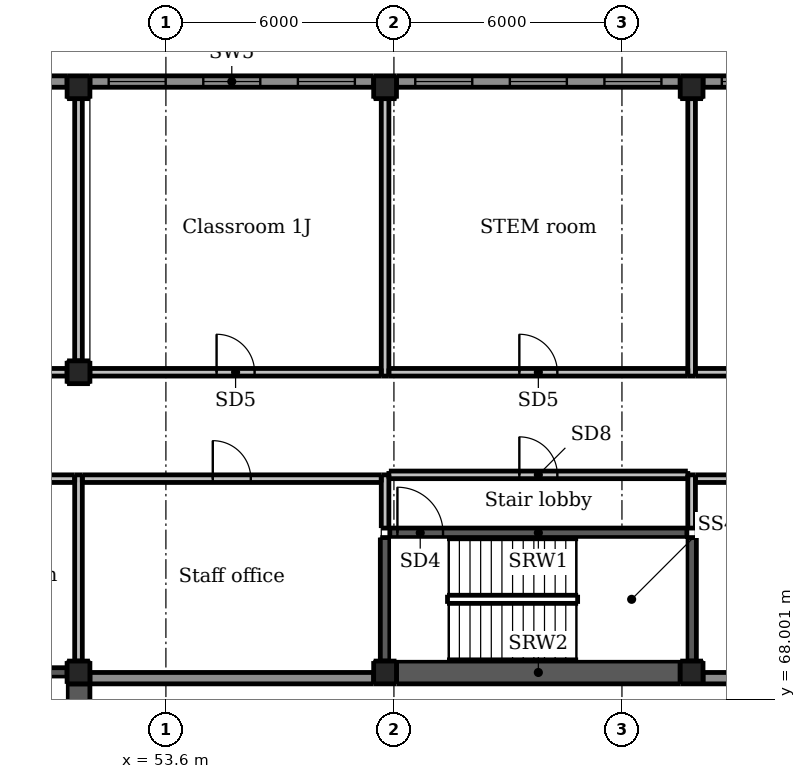
"""IFC4 building model, lengths in metres.
Left out: names, types, materials, properties, quantities, classifications, styles, units other than length and angle.
Written with IfcOpenShell. Run it as: python <this file> out.ifc"""

import sys

from ifc_helpers import new_model, si_unit, direction, frame, frame_2d, origin, origin_2d, place, context, subcontext, project, spatial, rectangle, extrude, element, fill, save


model = new_model("IFC4")
c1 = context("Model", 3, precision=1e-05, world=origin(), true_north=direction((0.0, 1.0)))
c2 = subcontext(c1, "Body", "Model", "MODEL_VIEW")
j1 = project(units=[si_unit("LENGTHUNIT", "METRE"), si_unit("PLANEANGLEUNIT", "RADIAN")], contexts=[c1])
p1 = place(None, origin())
s1 = spatial("IfcSite", under=j1, at=p1, CompositionType="ELEMENT")
p2 = place(p1, origin())
s2 = spatial("IfcBuilding", under=s1, at=p2, CompositionType="ELEMENT")
p3 = place(p2, frame((0.0, 0.0, 5.5)))
s3 = spatial("IfcBuildingStorey", under=s2, at=p3, CompositionType="ELEMENT", Elevation=5.5)
for number, where, z_axis, x_axis in (
    (1, (51.3, 68.7, -0.3), (0.0, 0.0, 1.0), (1.0, 0.0, 0.0)),
    (2, (51.3, 76.6, -0.3), (0.0, 0.0, 1.0), (1.0, 0.0, 0.0)),
    (3, (51.3, 84.1, -0.3), (0.0, 0.0, 1.0), (1.0, 0.0, 0.0)),
    (4, (59.367, 84.1, -0.3), (0.0, 0.0, 1.0), (1.0, 0.0, 0.0)),
    (5, (59.367, 68.7, -0.3), (0.0, 0.0, 1.0), (1.0, 0.0, 0.0)),
    (6, (67.433, 84.1, -0.3), (0.0, 0.0, 1.0), (1.0, 0.0, 0.0)),
    (7, (67.433, 68.7, -0.3), (0.0, 0.0, 1.0), (1.0, 0.0, 0.0)),
):
    element("IfcColumn", number, at=place(p3, frame(where, z_axis=z_axis, x_axis=x_axis)), inside=s3, PredefinedType="COLUMN", context=c2, shape_type="SweptSolid", body=[
        extrude(rectangle(XDim=0.6, YDim=0.6, at=origin_2d()), origin(), (0.0, 0.0, 1.0), 4.5),
    ])
p4 = place(p3, frame((47.5, 68.7, -0.3), z_axis=(0.0, 0.0, 1.0), x_axis=(1.0, 0.0, 0.0)))
e8 = element("IfcWall", 8, at=p4, inside=s3, PredefinedType="SHEAR", context=c2, shape_type="SweptSolid", body=[
    extrude(rectangle(XDim=3.5, YDim=0.25, at=frame_2d((1.75, 0.0))), origin(), (0.0, 0.0, 1.0), 4.5),
])
p5 = place(p3, frame((51.3, 61.45, -0.3), z_axis=(0.0, 0.0, 1.0), x_axis=(0.0, 1.0, 0.0)))
e9 = element("IfcWall", 9, at=p5, inside=s3, PredefinedType="SHEAR", context=c2, shape_type="SweptSolid", body=[
    extrude(rectangle(XDim=6.95, YDim=0.6, at=frame_2d((3.475, 0.0))), origin(), (0.0, 0.0, 1.0), 4.5),
])
p6 = place(p3, frame((59.492, 72.375, -0.3), z_axis=(0.0, 0.0, 1.0), x_axis=(1.0, 0.0, 0.0)))
e10 = element("IfcWall", 10, at=p6, inside=s3, PredefinedType="SHEAR", context=c2, shape_type="SweptSolid", body=[
    extrude(rectangle(XDim=7.816, YDim=0.25, at=frame_2d((3.908, 0.0))), origin(), (0.0, 0.0, 1.0), 4.5),
])
p7 = place(p6, frame((0.2, 0.0, 0.3)))
e11 = element("IfcOpeningElement", 11, at=p7, cuts=e10, PredefinedType="OPENING", context=c2, shape_type="SweptSolid", body=[
    extrude(rectangle(XDim=1.2, YDim=2.1, at=frame_2d((0.6, 1.05))), frame((0.0, 0.135, 0.0), z_axis=(0.0, -1.0, 0.0), x_axis=(1.0, 0.0, 0.0)), (0.0, 0.0, 1.0), 0.27),
])
for number, where, z_axis, x_axis in (
    (12, (59.367, 69.0, -0.3), (0.0, 0.0, 1.0), (0.0, 1.0, 0.0)),
    (13, (67.433, 69.0, -0.3), (0.0, 0.0, 1.0), (0.0, 1.0, 0.0)),
):
    element("IfcWall", number, at=place(p3, frame(where, z_axis=z_axis, x_axis=x_axis)), inside=s3, PredefinedType="SHEAR", context=c2, shape_type="SweptSolid", body=[
        extrude(rectangle(XDim=3.25, YDim=0.25, at=frame_2d((1.625, 0.0))), origin(), (0.0, 0.0, 1.0), 4.5),
    ])
p8 = place(p3, frame((59.667, 68.7, -0.3), z_axis=(0.0, 0.0, 1.0), x_axis=(1.0, 0.0, 0.0)))
e14 = element("IfcWall", 14, at=p8, inside=s3, PredefinedType="SHEAR", context=c2, shape_type="SweptSolid", body=[
    extrude(rectangle(XDim=7.466, YDim=0.6, at=frame_2d((3.733, 0.0))), origin(), (0.0, 0.0, 1.0), 4.5),
])
p9 = place(p3, frame((43.9, 84.25, 0.0), z_axis=(0.0, 0.0, 1.0), x_axis=(1.0, 0.0, 0.0)))
e15 = element("IfcWall", 15, at=p9, inside=s3, PredefinedType="SOLIDWALL", context=c2, shape_type="SweptSolid", body=[
    extrude(rectangle(XDim=7.1, YDim=0.3, at=frame_2d((3.55, 0.0))), origin(), (0.0, 0.0, 1.0), 3.3),
])
p10 = place(p9, frame((0.433, 0.0, 0.9)))
e16 = element("IfcOpeningElement", 16, at=p10, cuts=e15, PredefinedType="OPENING", context=c2, shape_type="SweptSolid", body=[
    extrude(rectangle(XDim=1.5, YDim=1.5, at=frame_2d((0.75, 0.75))), frame((0.0, 0.16, 0.0), z_axis=(0.0, -1.0, 0.0), x_axis=(1.0, 0.0, 0.0)), (0.0, 0.0, 1.0), 0.32),
])
p11 = place(p9, frame((2.8, 0.0, 0.9)))
e17 = element("IfcOpeningElement", 17, at=p11, cuts=e15, PredefinedType="OPENING", context=c2, shape_type="SweptSolid", body=[
    extrude(rectangle(XDim=1.5, YDim=1.5, at=frame_2d((0.75, 0.75))), frame((0.0, 0.16, 0.0), z_axis=(0.0, -1.0, 0.0), x_axis=(1.0, 0.0, 0.0)), (0.0, 0.0, 1.0), 0.32),
])
p12 = place(p9, frame((5.167, 0.0, 0.9)))
e18 = element("IfcOpeningElement", 18, at=p12, cuts=e15, PredefinedType="OPENING", context=c2, shape_type="SweptSolid", body=[
    extrude(rectangle(XDim=1.5, YDim=1.5, at=frame_2d((0.75, 0.75))), frame((0.0, 0.16, 0.0), z_axis=(0.0, -1.0, 0.0), x_axis=(1.0, 0.0, 0.0)), (0.0, 0.0, 1.0), 0.32),
])
p13 = place(p3, frame((51.6, 84.25, 0.0), z_axis=(0.0, 0.0, 1.0), x_axis=(1.0, 0.0, 0.0)))
e19 = element("IfcWall", 19, at=p13, inside=s3, PredefinedType="SOLIDWALL", context=c2, shape_type="SweptSolid", body=[
    extrude(rectangle(XDim=7.467, YDim=0.3, at=frame_2d((3.733, 0.0))), origin(), (0.0, 0.0, 1.0), 3.3),
])
p14 = place(p13, frame((0.494, 0.0, 0.9)))
e20 = element("IfcOpeningElement", 20, at=p14, cuts=e19, PredefinedType="OPENING", context=c2, shape_type="SweptSolid", body=[
    extrude(rectangle(XDim=1.5, YDim=1.5, at=frame_2d((0.75, 0.75))), frame((0.0, 0.16, 0.0), z_axis=(0.0, -1.0, 0.0), x_axis=(1.0, 0.0, 0.0)), (0.0, 0.0, 1.0), 0.32),
])
p15 = place(p13, frame((2.983, 0.0, 0.9)))
e21 = element("IfcOpeningElement", 21, at=p15, cuts=e19, PredefinedType="OPENING", context=c2, shape_type="SweptSolid", body=[
    extrude(rectangle(XDim=1.5, YDim=1.5, at=frame_2d((0.75, 0.75))), frame((0.0, 0.16, 0.0), z_axis=(0.0, -1.0, 0.0), x_axis=(1.0, 0.0, 0.0)), (0.0, 0.0, 1.0), 0.32),
])
p16 = place(p13, frame((5.472, 0.0, 0.9)))
e22 = element("IfcOpeningElement", 22, at=p16, cuts=e19, PredefinedType="OPENING", context=c2, shape_type="SweptSolid", body=[
    extrude(rectangle(XDim=1.5, YDim=1.5, at=frame_2d((0.75, 0.75))), frame((0.0, 0.16, 0.0), z_axis=(0.0, -1.0, 0.0), x_axis=(1.0, 0.0, 0.0)), (0.0, 0.0, 1.0), 0.32),
])
p17 = place(p3, frame((59.667, 84.25, 0.0), z_axis=(0.0, 0.0, 1.0), x_axis=(1.0, 0.0, 0.0)))
e23 = element("IfcWall", 23, at=p17, inside=s3, PredefinedType="SOLIDWALL", context=c2, shape_type="SweptSolid", body=[
    extrude(rectangle(XDim=7.466, YDim=0.3, at=frame_2d((3.733, 0.0))), origin(), (0.0, 0.0, 1.0), 3.3),
])
p18 = place(p17, frame((0.494, 0.0, 0.9)))
e24 = element("IfcOpeningElement", 24, at=p18, cuts=e23, PredefinedType="OPENING", context=c2, shape_type="SweptSolid", body=[
    extrude(rectangle(XDim=1.5, YDim=1.5, at=frame_2d((0.75, 0.75))), frame((0.0, 0.16, 0.0), z_axis=(0.0, -1.0, 0.0), x_axis=(1.0, 0.0, 0.0)), (0.0, 0.0, 1.0), 0.32),
])
p19 = place(p17, frame((2.983, 0.0, 0.9)))
e25 = element("IfcOpeningElement", 25, at=p19, cuts=e23, PredefinedType="OPENING", context=c2, shape_type="SweptSolid", body=[
    extrude(rectangle(XDim=1.5, YDim=1.5, at=frame_2d((0.75, 0.75))), frame((0.0, 0.16, 0.0), z_axis=(0.0, -1.0, 0.0), x_axis=(1.0, 0.0, 0.0)), (0.0, 0.0, 1.0), 0.32),
])
p20 = place(p17, frame((5.472, 0.0, 0.9)))
e26 = element("IfcOpeningElement", 26, at=p20, cuts=e23, PredefinedType="OPENING", context=c2, shape_type="SweptSolid", body=[
    extrude(rectangle(XDim=1.5, YDim=1.5, at=frame_2d((0.75, 0.75))), frame((0.0, 0.16, 0.0), z_axis=(0.0, -1.0, 0.0), x_axis=(1.0, 0.0, 0.0)), (0.0, 0.0, 1.0), 0.32),
])
p21 = place(p3, frame((67.733, 84.25, 0.0), z_axis=(0.0, 0.0, 1.0), x_axis=(1.0, 0.0, 0.0)))
e27 = element("IfcWall", 27, at=p21, inside=s3, PredefinedType="SOLIDWALL", context=c2, shape_type="SweptSolid", body=[
    extrude(rectangle(XDim=7.467, YDim=0.3, at=frame_2d((3.733, 0.0))), origin(), (0.0, 0.0, 1.0), 3.3),
])
p22 = place(p21, frame((0.494, 0.0, 0.9)))
e28 = element("IfcOpeningElement", 28, at=p22, cuts=e27, PredefinedType="OPENING", context=c2, shape_type="SweptSolid", body=[
    extrude(rectangle(XDim=1.5, YDim=1.5, at=frame_2d((0.75, 0.75))), frame((0.0, 0.16, 0.0), z_axis=(0.0, -1.0, 0.0), x_axis=(1.0, 0.0, 0.0)), (0.0, 0.0, 1.0), 0.32),
])
p23 = place(p21, frame((2.983, 0.0, 0.9)))
e29 = element("IfcOpeningElement", 29, at=p23, cuts=e27, PredefinedType="OPENING", context=c2, shape_type="SweptSolid", body=[
    extrude(rectangle(XDim=1.5, YDim=1.5, at=frame_2d((0.75, 0.75))), frame((0.0, 0.16, 0.0), z_axis=(0.0, -1.0, 0.0), x_axis=(1.0, 0.0, 0.0)), (0.0, 0.0, 1.0), 0.32),
])
p24 = place(p21, frame((5.472, 0.0, 0.9)))
e30 = element("IfcOpeningElement", 30, at=p24, cuts=e27, PredefinedType="OPENING", context=c2, shape_type="SweptSolid", body=[
    extrude(rectangle(XDim=1.5, YDim=1.5, at=frame_2d((0.75, 0.75))), frame((0.0, 0.16, 0.0), z_axis=(0.0, -1.0, 0.0), x_axis=(1.0, 0.0, 0.0)), (0.0, 0.0, 1.0), 0.32),
])
p25 = place(p3, frame((51.6, 68.55, 0.0), z_axis=(0.0, 0.0, 1.0), x_axis=(1.0, 0.0, 0.0)))
e31 = element("IfcWall", 31, at=p25, inside=s3, PredefinedType="SOLIDWALL", context=c2, shape_type="SweptSolid", body=[
    extrude(rectangle(XDim=7.467, YDim=0.3, at=frame_2d((3.733, 0.0))), origin(), (0.0, 0.0, 1.0), 3.3),
])
p26 = place(p3, frame((67.733, 68.55, 0.0), z_axis=(0.0, 0.0, 1.0), x_axis=(1.0, 0.0, 0.0)))
e32 = element("IfcWall", 32, at=p26, inside=s3, PredefinedType="SOLIDWALL", context=c2, shape_type="SweptSolid", body=[
    extrude(rectangle(XDim=7.467, YDim=0.3, at=frame_2d((3.733, 0.0))), origin(), (0.0, 0.0, 1.0), 3.3),
])
p27 = place(p3, frame((36.2, 76.6, 0.0), z_axis=(0.0, 0.0, 1.0), x_axis=(1.0, 0.0, 0.0)))
e33 = element("IfcWall", 33, at=p27, inside=s3, PredefinedType="PARTITIONING", context=c2, shape_type="SweptSolid", body=[
    extrude(rectangle(XDim=14.8, YDim=0.2, at=frame_2d((7.4, 0.0))), origin(), (0.0, 0.0, 1.0), 3.1),
])
p28 = place(p27, frame((11.1, 0.0, 0.0)))
e34 = element("IfcOpeningElement", 34, at=p28, cuts=e33, PredefinedType="OPENING", context=c2, shape_type="SweptSolid", body=[
    extrude(rectangle(XDim=1.0, YDim=2.1, at=frame_2d((0.5, 1.05))), frame((0.0, 0.11, 0.0), z_axis=(0.0, -1.0, 0.0), x_axis=(1.0, 0.0, 0.0)), (0.0, 0.0, 1.0), 0.22),
])
p29 = place(p3, frame((51.3, 76.9, 0.0), z_axis=(0.0, 0.0, 1.0), x_axis=(0.0, 1.0, 0.0)))
e35 = element("IfcWall", 35, at=p29, inside=s3, PredefinedType="PARTITIONING", context=c2, shape_type="SweptSolid", body=[
    extrude(rectangle(XDim=6.9, YDim=0.2, at=frame_2d((3.45, 0.0))), origin(), (0.0, 0.0, 1.0), 3.1),
])
p30 = place(p3, frame((51.6, 76.6, 0.0), z_axis=(0.0, 0.0, 1.0), x_axis=(1.0, 0.0, 0.0)))
e36 = element("IfcWall", 36, at=p30, inside=s3, PredefinedType="PARTITIONING", context=c2, shape_type="SweptSolid", body=[
    extrude(rectangle(XDim=7.667, YDim=0.2, at=frame_2d((3.833, 0.0))), origin(), (0.0, 0.0, 1.0), 3.1),
])
p31 = place(p30, frame((3.333, 0.0, 0.0)))
e37 = element("IfcOpeningElement", 37, at=p31, cuts=e36, PredefinedType="OPENING", context=c2, shape_type="SweptSolid", body=[
    extrude(rectangle(XDim=1.0, YDim=2.1, at=frame_2d((0.5, 1.05))), frame((0.0, 0.11, 0.0), z_axis=(0.0, -1.0, 0.0), x_axis=(1.0, 0.0, 0.0)), (0.0, 0.0, 1.0), 0.22),
])
p32 = place(p3, frame((59.467, 76.6, 0.0), z_axis=(0.0, 0.0, 1.0), x_axis=(1.0, 0.0, 0.0)))
e38 = element("IfcWall", 38, at=p32, inside=s3, PredefinedType="PARTITIONING", context=c2, shape_type="SweptSolid", body=[
    extrude(rectangle(XDim=7.866, YDim=0.2, at=frame_2d((3.933, 0.0))), origin(), (0.0, 0.0, 1.0), 3.1),
])
p33 = place(p32, frame((3.433, 0.0, 0.0)))
e39 = element("IfcOpeningElement", 39, at=p33, cuts=e38, PredefinedType="OPENING", context=c2, shape_type="SweptSolid", body=[
    extrude(rectangle(XDim=1.0, YDim=2.1, at=frame_2d((0.5, 1.05))), frame((0.0, 0.11, 0.0), z_axis=(0.0, -1.0, 0.0), x_axis=(1.0, 0.0, 0.0)), (0.0, 0.0, 1.0), 0.22),
])
p34 = place(p3, frame((67.533, 76.6, 0.0), z_axis=(0.0, 0.0, 1.0), x_axis=(1.0, 0.0, 0.0)))
e40 = element("IfcWall", 40, at=p34, inside=s3, PredefinedType="PARTITIONING", context=c2, shape_type="SweptSolid", body=[
    extrude(rectangle(XDim=7.867, YDim=0.2, at=frame_2d((3.934, 0.0))), origin(), (0.0, 0.0, 1.0), 3.1),
])
p35 = place(p34, frame((3.434, 0.0, 0.0)))
e41 = element("IfcOpeningElement", 41, at=p35, cuts=e40, PredefinedType="OPENING", context=c2, shape_type="SweptSolid", body=[
    extrude(rectangle(XDim=1.0, YDim=2.1, at=frame_2d((0.5, 1.05))), frame((0.0, 0.11, 0.0), z_axis=(0.0, -1.0, 0.0), x_axis=(1.0, 0.0, 0.0)), (0.0, 0.0, 1.0), 0.22),
])
for number, where, z_axis, x_axis in (
    (42, (59.367, 76.5, 0.0), (0.0, 0.0, 1.0), (0.0, 1.0, 0.0)),
    (43, (67.433, 76.5, 0.0), (0.0, 0.0, 1.0), (0.0, 1.0, 0.0)),
):
    element("IfcWall", number, at=place(p3, frame(where, z_axis=z_axis, x_axis=x_axis)), inside=s3, PredefinedType="PARTITIONING", context=c2, shape_type="SweptSolid", body=[
        extrude(rectangle(XDim=7.3, YDim=0.2, at=frame_2d((3.65, 0.0))), origin(), (0.0, 0.0, 1.0), 3.1),
    ])
p36 = place(p3, frame((51.4, 73.8, 0.0), z_axis=(0.0, 0.0, 1.0), x_axis=(1.0, 0.0, 0.0)))
e44 = element("IfcWall", 44, at=p36, inside=s3, PredefinedType="PARTITIONING", context=c2, shape_type="SweptSolid", body=[
    extrude(rectangle(XDim=7.867, YDim=0.2, at=frame_2d((3.934, 0.0))), origin(), (0.0, 0.0, 1.0), 3.1),
])
p37 = place(p36, frame((3.434, 0.0, 0.0)))
e45 = element("IfcOpeningElement", 45, at=p37, cuts=e44, PredefinedType="OPENING", context=c2, shape_type="SweptSolid", body=[
    extrude(rectangle(XDim=1.0, YDim=2.1, at=frame_2d((0.5, 1.05))), frame((0.0, 0.11, 0.0), z_axis=(0.0, -1.0, 0.0), x_axis=(1.0, 0.0, 0.0)), (0.0, 0.0, 1.0), 0.22),
])
p38 = place(p3, frame((67.533, 73.8, 0.0), z_axis=(0.0, 0.0, 1.0), x_axis=(1.0, 0.0, 0.0)))
e46 = element("IfcWall", 46, at=p38, inside=s3, PredefinedType="PARTITIONING", context=c2, shape_type="SweptSolid", body=[
    extrude(rectangle(XDim=7.867, YDim=0.2, at=frame_2d((3.934, 0.0))), origin(), (0.0, 0.0, 1.0), 3.1),
])
p39 = place(p38, frame((3.483, 0.0, 0.0)))
e47 = element("IfcOpeningElement", 47, at=p39, cuts=e46, PredefinedType="OPENING", context=c2, shape_type="SweptSolid", body=[
    extrude(rectangle(XDim=0.9, YDim=2.1, at=frame_2d((0.45, 1.05))), frame((0.0, 0.11, 0.0), z_axis=(0.0, -1.0, 0.0), x_axis=(1.0, 0.0, 0.0)), (0.0, 0.0, 1.0), 0.22),
])
for number, where, z_axis, x_axis in (
    (48, (59.367, 72.5, 0.0), (0.0, 0.0, 1.0), (0.0, 1.0, 0.0)),
    (49, (67.433, 72.5, 0.0), (0.0, 0.0, 1.0), (0.0, 1.0, 0.0)),
):
    element("IfcWall", number, at=place(p3, frame(where, z_axis=z_axis, x_axis=x_axis)), inside=s3, PredefinedType="PARTITIONING", context=c2, shape_type="SweptSolid", body=[
        extrude(rectangle(XDim=1.4, YDim=0.2, at=frame_2d((0.7, 0.0))), origin(), (0.0, 0.0, 1.0), 3.1),
    ])
p40 = place(p3, frame((46.1, 73.8, 0.0), z_axis=(0.0, 0.0, 1.0), x_axis=(1.0, 0.0, 0.0)))
e50 = element("IfcWall", 50, at=p40, inside=s3, PredefinedType="PARTITIONING", context=c2, shape_type="SweptSolid", body=[
    extrude(rectangle(XDim=5.1, YDim=0.2, at=frame_2d((2.55, 0.0))), origin(), (0.0, 0.0, 1.0), 3.1),
])
p41 = place(p3, frame((51.3, 69.0, 0.0), z_axis=(0.0, 0.0, 1.0), x_axis=(0.0, 1.0, 0.0)))
e51 = element("IfcWall", 51, at=p41, inside=s3, PredefinedType="PARTITIONING", context=c2, shape_type="SweptSolid", body=[
    extrude(rectangle(XDim=4.9, YDim=0.2, at=frame_2d((2.45, 0.0))), origin(), (0.0, 0.0, 1.0), 3.1),
])
p42 = place(p3, frame((59.467, 73.9, 0.0), z_axis=(0.0, 0.0, 1.0), x_axis=(1.0, 0.0, 0.0)))
e52 = element("IfcWall", 52, at=p42, inside=s3, PredefinedType="PARTITIONING", context=c2, shape_type="SweptSolid", body=[
    extrude(rectangle(XDim=7.866, YDim=0.2, at=frame_2d((3.933, 0.0))), origin(), (0.0, 0.0, 1.0), 3.1),
])
p43 = place(p42, frame((3.433, 0.0, 0.0)))
e53 = element("IfcOpeningElement", 53, at=p43, cuts=e52, PredefinedType="OPENING", context=c2, shape_type="SweptSolid", body=[
    extrude(rectangle(XDim=1.0, YDim=2.1, at=frame_2d((0.5, 1.05))), frame((0.0, 0.11, 0.0), z_axis=(0.0, -1.0, 0.0), x_axis=(1.0, 0.0, 0.0)), (0.0, 0.0, 1.0), 0.22),
])
p44 = place(p14, origin())
e54 = element("IfcWindow", 54, at=p44, inside=s3, PartitioningType="DOUBLE_PANEL_HORIZONTAL", PredefinedType="WINDOW", context=c2, shape_type="SweptSolid", body=[
    extrude(rectangle(XDim=1.5, YDim=1.5, at=frame_2d((0.75, 0.75))), frame((0.0, 0.03, 0.0), z_axis=(0.0, -1.0, 0.0), x_axis=(1.0, 0.0, 0.0)), (0.0, 0.0, 1.0), 0.06),
])
fill(e20, e54)
p45 = place(p15, origin())
e55 = element("IfcWindow", 55, at=p45, inside=s3, PartitioningType="DOUBLE_PANEL_HORIZONTAL", PredefinedType="WINDOW", context=c2, shape_type="SweptSolid", body=[
    extrude(rectangle(XDim=1.5, YDim=1.5, at=frame_2d((0.75, 0.75))), frame((0.0, 0.03, 0.0), z_axis=(0.0, -1.0, 0.0), x_axis=(1.0, 0.0, 0.0)), (0.0, 0.0, 1.0), 0.06),
])
fill(e21, e55)
p46 = place(p16, origin())
e56 = element("IfcWindow", 56, at=p46, inside=s3, PartitioningType="DOUBLE_PANEL_HORIZONTAL", PredefinedType="WINDOW", context=c2, shape_type="SweptSolid", body=[
    extrude(rectangle(XDim=1.5, YDim=1.5, at=frame_2d((0.75, 0.75))), frame((0.0, 0.03, 0.0), z_axis=(0.0, -1.0, 0.0), x_axis=(1.0, 0.0, 0.0)), (0.0, 0.0, 1.0), 0.06),
])
fill(e22, e56)
p47 = place(p18, origin())
e57 = element("IfcWindow", 57, at=p47, inside=s3, PartitioningType="DOUBLE_PANEL_HORIZONTAL", PredefinedType="WINDOW", context=c2, shape_type="SweptSolid", body=[
    extrude(rectangle(XDim=1.5, YDim=1.5, at=frame_2d((0.75, 0.75))), frame((0.0, 0.03, 0.0), z_axis=(0.0, -1.0, 0.0), x_axis=(1.0, 0.0, 0.0)), (0.0, 0.0, 1.0), 0.06),
])
fill(e24, e57)
p48 = place(p19, origin())
e58 = element("IfcWindow", 58, at=p48, inside=s3, PartitioningType="DOUBLE_PANEL_HORIZONTAL", PredefinedType="WINDOW", context=c2, shape_type="SweptSolid", body=[
    extrude(rectangle(XDim=1.5, YDim=1.5, at=frame_2d((0.75, 0.75))), frame((0.0, 0.03, 0.0), z_axis=(0.0, -1.0, 0.0), x_axis=(1.0, 0.0, 0.0)), (0.0, 0.0, 1.0), 0.06),
])
fill(e25, e58)
p49 = place(p20, origin())
e59 = element("IfcWindow", 59, at=p49, inside=s3, PartitioningType="DOUBLE_PANEL_HORIZONTAL", PredefinedType="WINDOW", context=c2, shape_type="SweptSolid", body=[
    extrude(rectangle(XDim=1.5, YDim=1.5, at=frame_2d((0.75, 0.75))), frame((0.0, 0.03, 0.0), z_axis=(0.0, -1.0, 0.0), x_axis=(1.0, 0.0, 0.0)), (0.0, 0.0, 1.0), 0.06),
])
fill(e26, e59)
p50 = place(p22, origin())
e60 = element("IfcWindow", 60, at=p50, inside=s3, PartitioningType="DOUBLE_PANEL_HORIZONTAL", PredefinedType="WINDOW", context=c2, shape_type="SweptSolid", body=[
    extrude(rectangle(XDim=1.5, YDim=1.5, at=frame_2d((0.75, 0.75))), frame((0.0, 0.03, 0.0), z_axis=(0.0, -1.0, 0.0), x_axis=(1.0, 0.0, 0.0)), (0.0, 0.0, 1.0), 0.06),
])
fill(e28, e60)
p51 = place(p31, origin())
e61 = element("IfcDoor", 61, at=p51, inside=s3, OperationType="SINGLE_SWING_LEFT", PredefinedType="DOOR", context=c2, shape_type="SweptSolid", body=[
    extrude(rectangle(XDim=1.0, YDim=2.1, at=frame_2d((0.5, 1.05))), frame((0.0, 0.025, 0.0), z_axis=(0.0, -1.0, 0.0), x_axis=(1.0, 0.0, 0.0)), (0.0, 0.0, 1.0), 0.05),
])
fill(e37, e61)
p52 = place(p33, origin())
e62 = element("IfcDoor", 62, at=p52, inside=s3, OperationType="SINGLE_SWING_LEFT", PredefinedType="DOOR", context=c2, shape_type="SweptSolid", body=[
    extrude(rectangle(XDim=1.0, YDim=2.1, at=frame_2d((0.5, 1.05))), frame((0.0, 0.025, 0.0), z_axis=(0.0, -1.0, 0.0), x_axis=(1.0, 0.0, 0.0)), (0.0, 0.0, 1.0), 0.05),
])
fill(e39, e62)
p53 = place(p37, origin())
e63 = element("IfcDoor", 63, at=p53, inside=s3, OperationType="SINGLE_SWING_LEFT", PredefinedType="DOOR", context=c2, shape_type="SweptSolid", body=[
    extrude(rectangle(XDim=1.0, YDim=2.1, at=frame_2d((0.5, 1.05))), frame((0.0, 0.025, 0.0), z_axis=(0.0, -1.0, 0.0), x_axis=(1.0, 0.0, 0.0)), (0.0, 0.0, 1.0), 0.05),
])
fill(e45, e63)
p54 = place(p43, origin())
e64 = element("IfcDoor", 64, at=p54, inside=s3, OperationType="SINGLE_SWING_LEFT", PredefinedType="DOOR", context=c2, shape_type="SweptSolid", body=[
    extrude(rectangle(XDim=1.0, YDim=2.1, at=frame_2d((0.5, 1.05))), frame((0.0, 0.025, 0.0), z_axis=(0.0, -1.0, 0.0), x_axis=(1.0, 0.0, 0.0)), (0.0, 0.0, 1.0), 0.05),
])
fill(e53, e64)
p55 = place(p7, origin())
e65 = element("IfcDoor", 65, at=p55, inside=s3, OperationType="SINGLE_SWING_LEFT", PredefinedType="DOOR", context=c2, shape_type="SweptSolid", body=[
    extrude(rectangle(XDim=1.2, YDim=2.1, at=frame_2d((0.6, 1.05))), frame((0.0, 0.025, 0.0), z_axis=(0.0, -1.0, 0.0), x_axis=(1.0, 0.0, 0.0)), (0.0, 0.0, 1.0), 0.05),
])
fill(e11, e65)
save(model, sys.argv[1])
